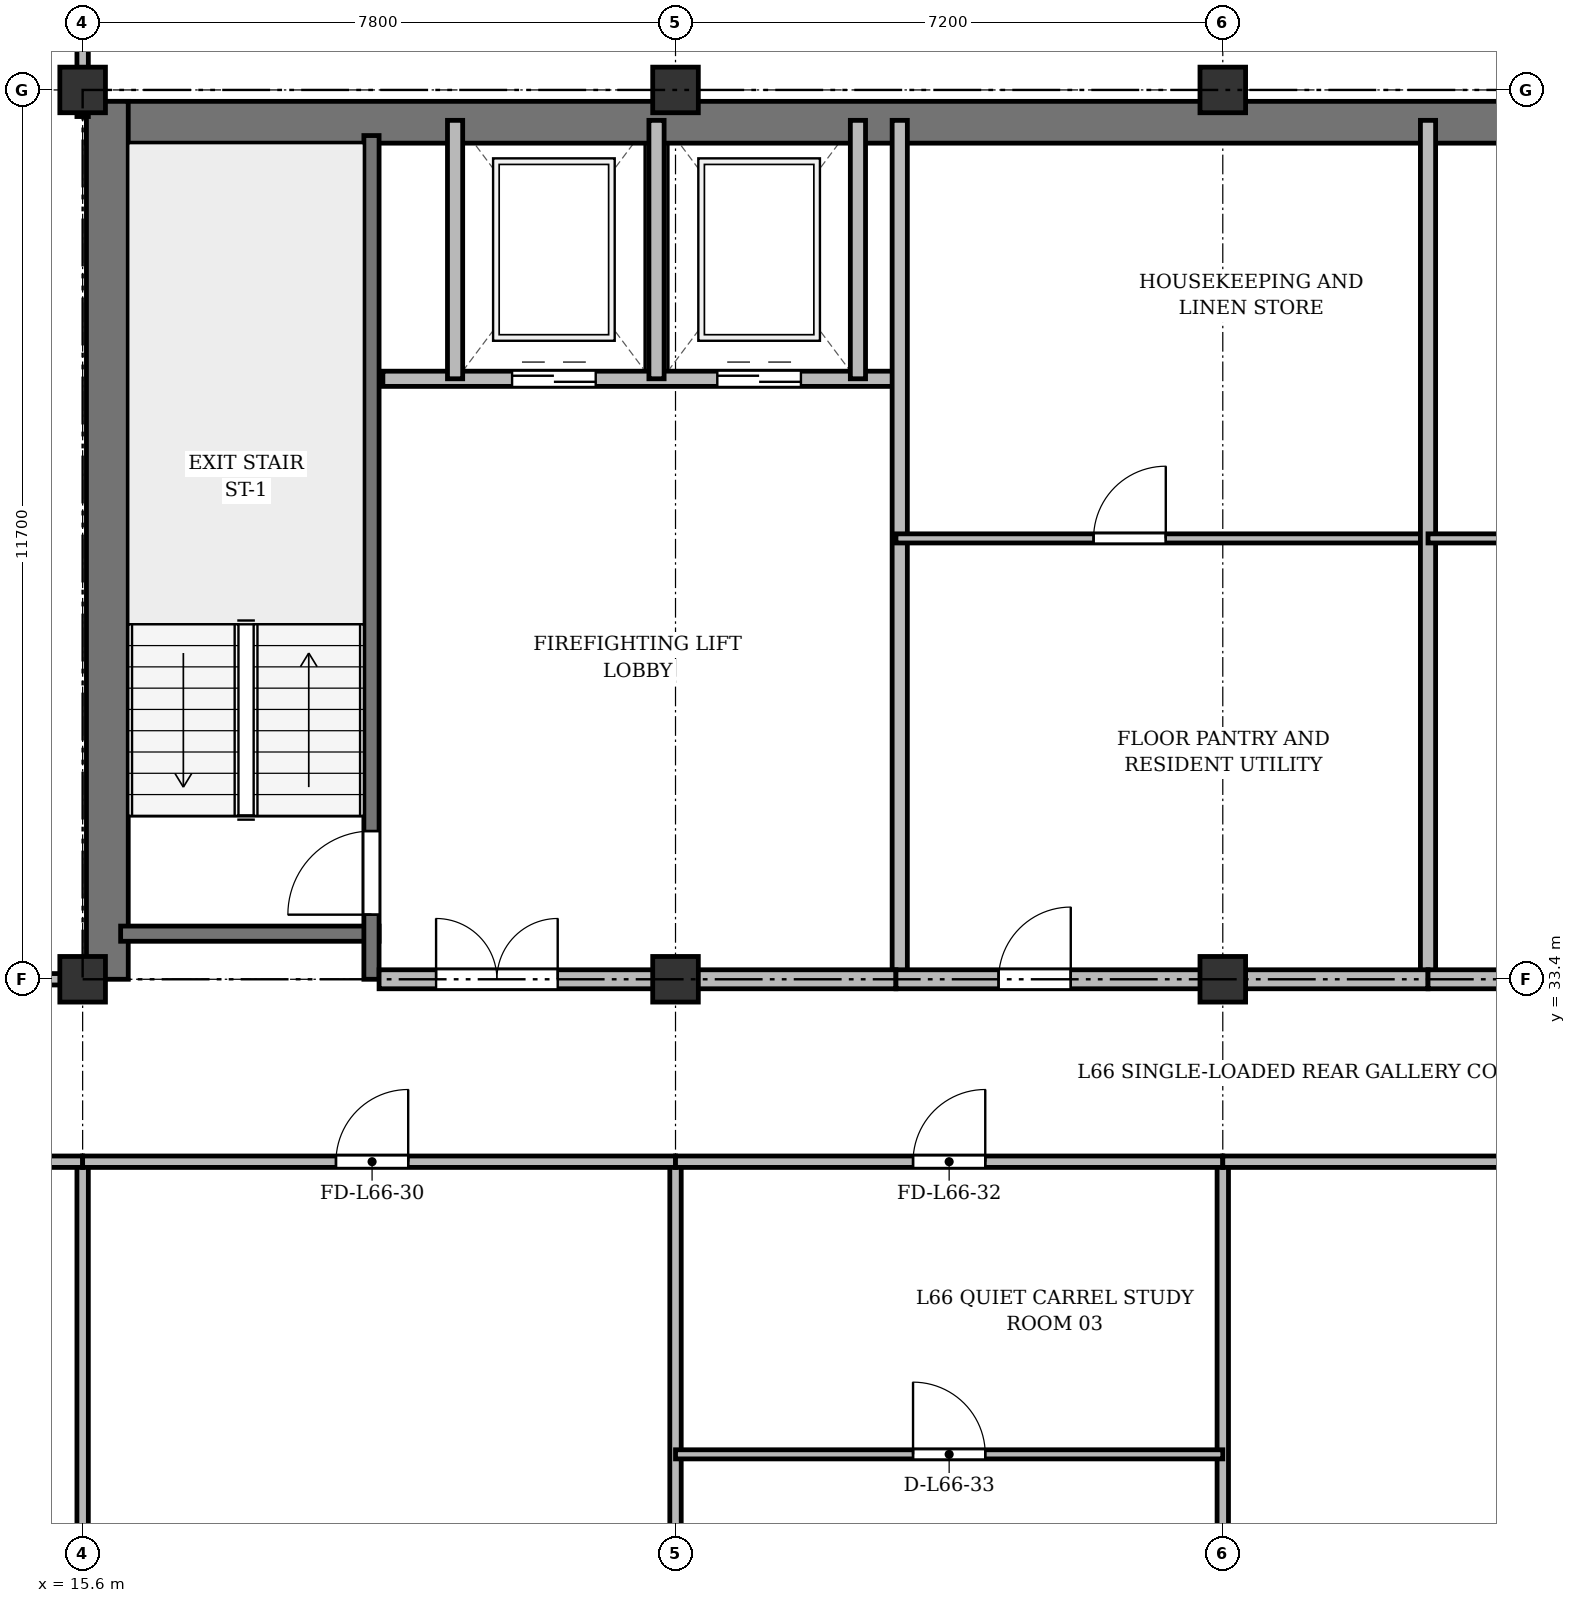
"""IFC4 building model, lengths in metres.
Left out: names, types, materials, properties, quantities, classifications, styles, units other than length and angle.
Written with IfcOpenShell. Run it as: python <this file> out.ifc"""

import sys

from ifc_helpers import new_model, si_unit, direction, frame, frame_2d, origin, origin_2d, place, context, subcontext, project, spatial, rectangle, extrude, source, transform, mapped, element, fill, save


model = new_model("IFC4")
c1 = context("Model", 3, precision=1e-05, world=origin(), true_north=direction((0.0, 1.0)))
c2 = subcontext(c1, "Body", "Model", "MODEL_VIEW")
j1 = project(units=[si_unit("LENGTHUNIT", "METRE"), si_unit("PLANEANGLEUNIT", "RADIAN")], contexts=[c1])
p1 = place(None, origin())
s1 = spatial("IfcSite", under=j1, at=p1, CompositionType="ELEMENT")
p2 = place(p1, origin())
s2 = spatial("IfcBuilding", under=s1, at=p2, CompositionType="ELEMENT")
p3 = place(p2, frame((0.0, 0.0, 255.9)))
s3 = spatial("IfcBuildingStorey", under=s2, at=p3, CompositionType="ELEMENT", Elevation=255.9)
m1 = source(origin(), c2, "Body", "SweptSolid", [
    extrude(rectangle(XDim=0.6, YDim=0.6, at=origin_2d()), origin(), (0.0, 0.0, 1.0), 3.6),
])
for number, where, z_axis, x_axis in (
    (1, (15.6, 33.4, 0.0), (0.0, 0.0, 1.0), (1.0, 0.0, 0.0)),
    (2, (15.6, 45.1, 0.0), (0.0, 0.0, 1.0), (1.0, 0.0, 0.0)),
    (3, (23.4, 33.4, 0.0), (0.0, 0.0, 1.0), (1.0, 0.0, 0.0)),
    (4, (23.4, 45.1, 0.0), (0.0, 0.0, 1.0), (1.0, 0.0, 0.0)),
    (5, (30.6, 33.4, 0.0), (0.0, 0.0, 1.0), (1.0, 0.0, 0.0)),
    (6, (30.6, 45.1, 0.0), (0.0, 0.0, 1.0), (1.0, 0.0, 0.0)),
):
    element("IfcColumn", number, at=place(p3, frame(where, z_axis=z_axis, x_axis=x_axis)), inside=s3, PredefinedType="COLUMN", context=c2, shape_type="MappedRepresentation", body=[
        mapped(m1, transform((0.0, 0.0, 0.0), x_axis=(1.0, 0.0, 0.0), y_axis=(0.0, 1.0, 0.0), z_axis=(0.0, 0.0, 1.0), scale=1.0)),
    ])
p4 = place(p3, frame((15.65, 44.675, 0.0), z_axis=(0.0, 0.0, 1.0), x_axis=(1.0, 0.0, 0.0)))
e7 = element("IfcWall", 7, at=p4, inside=s3, PredefinedType="SHEAR", context=c2, shape_type="SweptSolid", body=[
    extrude(rectangle(XDim=43.1, YDim=0.55, at=frame_2d((21.55, 0.0))), origin(), (0.0, 0.0, 1.0), 3.37),
])
p5 = place(p3, frame((15.925, 33.4, 0.0), z_axis=(0.0, 0.0, 1.0), x_axis=(0.0, 1.0, 0.0)))
e8 = element("IfcWall", 8, at=p5, inside=s3, PredefinedType="SHEAR", context=c2, shape_type="SweptSolid", body=[
    extrude(rectangle(XDim=11.55, YDim=0.55, at=frame_2d((5.775, 0.0))), origin(), (0.0, 0.0, 1.0), 3.37),
])
p6 = place(p3, frame((16.1, 34.0, 0.0), z_axis=(0.0, 0.0, 1.0), x_axis=(1.0, 0.0, 0.0)))
e9 = element("IfcWall", 9, at=p6, inside=s3, PredefinedType="SHEAR", context=c2, shape_type="SweptSolid", body=[
    extrude(rectangle(XDim=3.4, YDim=0.2, at=frame_2d((1.7, 0.0))), origin(), (0.0, 0.0, 1.0), 3.37),
])
p7 = place(p3, frame((19.4, 33.4, 0.0), z_axis=(0.0, 0.0, 1.0), x_axis=(0.0, 1.0, 0.0)))
e10 = element("IfcWall", 10, at=p7, inside=s3, PredefinedType="SHEAR", context=c2, shape_type="SweptSolid", body=[
    extrude(rectangle(XDim=11.1, YDim=0.2, at=frame_2d((5.55, 0.0))), origin(), (0.0, 0.0, 1.0), 3.37),
])
p8 = place(p7, frame((0.85, 0.0, 0.0)))
e11 = element("IfcOpeningElement", 11, at=p8, cuts=e10, PredefinedType="OPENING", context=c2, shape_type="SweptSolid", body=[
    extrude(rectangle(XDim=1.1, YDim=2.15, at=frame_2d((0.55, 1.075))), frame((0.0, 0.11, 0.0), z_axis=(0.0, -1.0, 0.0), x_axis=(1.0, 0.0, 0.0)), (0.0, 0.0, 1.0), 0.22),
])
p9 = place(p3, frame((19.55, 41.3, 0.0), z_axis=(0.0, 0.0, 1.0), x_axis=(1.0, 0.0, 0.0)))
e12 = element("IfcWall", 12, at=p9, inside=s3, PredefinedType="SOLIDWALL", context=c2, shape_type="SweptSolid", body=[
    extrude(rectangle(XDim=6.75, YDim=0.2, at=frame_2d((3.375, 0.0))), origin(), (0.0, 0.0, 1.0), 3.37),
])
p10 = place(p9, frame((1.7, 0.0, 0.0)))
e13 = element("IfcOpeningElement", 13, at=p10, cuts=e12, PredefinedType="OPENING", context=c2, shape_type="SweptSolid", body=[
    extrude(rectangle(XDim=1.1, YDim=2.15, at=frame_2d((0.55, 1.075))), frame((0.0, 0.11, 0.0), z_axis=(0.0, -1.0, 0.0), x_axis=(1.0, 0.0, 0.0)), (0.0, 0.0, 1.0), 0.22),
])
p11 = place(p9, frame((4.4, 0.0, 0.0)))
e14 = element("IfcOpeningElement", 14, at=p11, cuts=e12, PredefinedType="OPENING", context=c2, shape_type="SweptSolid", body=[
    extrude(rectangle(XDim=1.1, YDim=2.15, at=frame_2d((0.55, 1.075))), frame((0.0, 0.11, 0.0), z_axis=(0.0, -1.0, 0.0), x_axis=(1.0, 0.0, 0.0)), (0.0, 0.0, 1.0), 0.22),
])
for number, where, z_axis, x_axis in (
    (15, (20.5, 41.3, 0.0), (0.0, 0.0, 1.0), (0.0, 1.0, 0.0)),
    (16, (23.15, 41.3, 0.0), (0.0, 0.0, 1.0), (0.0, 1.0, 0.0)),
    (17, (25.8, 41.3, 0.0), (0.0, 0.0, 1.0), (0.0, 1.0, 0.0)),
):
    element("IfcWall", number, at=place(p3, frame(where, z_axis=z_axis, x_axis=x_axis)), inside=s3, PredefinedType="SOLIDWALL", context=c2, shape_type="SweptSolid", body=[
        extrude(rectangle(XDim=3.4, YDim=0.2, at=frame_2d((1.7, 0.0))), origin(), (0.0, 0.0, 1.0), 3.37),
    ])
p12 = place(p3, frame((26.35, 33.4, 0.0), z_axis=(0.0, 0.0, 1.0), x_axis=(0.0, 1.0, 0.0)))
e18 = element("IfcWall", 18, at=p12, inside=s3, PredefinedType="SOLIDWALL", context=c2, shape_type="SweptSolid", body=[
    extrude(rectangle(XDim=11.3, YDim=0.2, at=frame_2d((5.65, 0.0))), origin(), (0.0, 0.0, 1.0), 2.92),
])
p13 = place(p3, frame((19.5, 33.4, 0.0), z_axis=(0.0, 0.0, 1.0), x_axis=(1.0, 0.0, 0.0)))
e19 = element("IfcWall", 19, at=p13, inside=s3, PredefinedType="PARTITIONING", context=c2, shape_type="SweptSolid", body=[
    extrude(rectangle(XDim=6.8, YDim=0.25, at=frame_2d((3.4, 0.0))), origin(), (0.0, 0.0, 1.0), 2.92),
])
p14 = place(p13, frame((0.75, 0.0, 0.0)))
e20 = element("IfcOpeningElement", 20, at=p14, cuts=e19, PredefinedType="OPENING", context=c2, shape_type="SweptSolid", body=[
    extrude(rectangle(XDim=1.6, YDim=2.2, at=frame_2d((0.8, 1.1))), frame((0.0, 0.135, 0.0), z_axis=(0.0, -1.0, 0.0), x_axis=(1.0, 0.0, 0.0)), (0.0, 0.0, 1.0), 0.27),
])
p15 = place(p3, frame((26.3, 39.2, 0.0), z_axis=(0.0, 0.0, 1.0), x_axis=(1.0, 0.0, 0.0)))
e21 = element("IfcWall", 21, at=p15, inside=s3, PredefinedType="PARTITIONING", context=c2, shape_type="SweptSolid", body=[
    extrude(rectangle(XDim=7.0, YDim=0.12, at=frame_2d((3.5, 0.0))), origin(), (0.0, 0.0, 1.0), 2.87),
])
p16 = place(p15, frame((2.6, 0.0, 0.0)))
e22 = element("IfcOpeningElement", 22, at=p16, cuts=e21, PredefinedType="OPENING", context=c2, shape_type="SweptSolid", body=[
    extrude(rectangle(XDim=0.95, YDim=2.15, at=frame_2d((0.475, 1.075))), frame((0.0, 0.07, 0.0), z_axis=(0.0, -1.0, 0.0), x_axis=(1.0, 0.0, 0.0)), (0.0, 0.0, 1.0), 0.14),
])
p17 = place(p3, frame((33.3, 33.4, 0.0), z_axis=(0.0, 0.0, 1.0), x_axis=(0.0, 1.0, 0.0)))
e23 = element("IfcWall", 23, at=p17, inside=s3, PredefinedType="SOLIDWALL", context=c2, shape_type="SweptSolid", body=[
    extrude(rectangle(XDim=11.3, YDim=0.2, at=frame_2d((5.65, 0.0))), origin(), (0.0, 0.0, 1.0), 2.92),
])
p18 = place(p3, frame((33.3, 39.2, 0.0), z_axis=(0.0, 0.0, 1.0), x_axis=(1.0, 0.0, 0.0)))
e24 = element("IfcWall", 24, at=p18, inside=s3, PredefinedType="PARTITIONING", context=c2, shape_type="SweptSolid", body=[
    extrude(rectangle(XDim=6.8, YDim=0.12, at=frame_2d((3.4, 0.0))), origin(), (0.0, 0.0, 1.0), 3.37),
])
p19 = place(p18, frame((2.6, 0.0, 0.0)))
e25 = element("IfcOpeningElement", 25, at=p19, cuts=e24, PredefinedType="OPENING", context=c2, shape_type="SweptSolid", body=[
    extrude(rectangle(XDim=0.95, YDim=2.15, at=frame_2d((0.475, 1.075))), frame((0.0, 0.07, 0.0), z_axis=(0.0, -1.0, 0.0), x_axis=(1.0, 0.0, 0.0)), (0.0, 0.0, 1.0), 0.14),
])
p20 = place(p3, frame((26.3, 33.4, 0.0), z_axis=(0.0, 0.0, 1.0), x_axis=(1.0, 0.0, 0.0)))
e26 = element("IfcWall", 26, at=p20, inside=s3, PredefinedType="PARTITIONING", context=c2, shape_type="SweptSolid", body=[
    extrude(rectangle(XDim=7.0, YDim=0.25, at=frame_2d((3.5, 0.0))), origin(), (0.0, 0.0, 1.0), 2.92),
])
p21 = place(p20, frame((1.35, 0.0, 0.0)))
e27 = element("IfcOpeningElement", 27, at=p21, cuts=e26, PredefinedType="OPENING", context=c2, shape_type="SweptSolid", body=[
    extrude(rectangle(XDim=0.95, YDim=2.15, at=frame_2d((0.475, 1.075))), frame((0.0, 0.135, 0.0), z_axis=(0.0, -1.0, 0.0), x_axis=(1.0, 0.0, 0.0)), (0.0, 0.0, 1.0), 0.27),
])
p22 = place(p3, frame((33.3, 33.4, 0.0), z_axis=(0.0, 0.0, 1.0), x_axis=(1.0, 0.0, 0.0)))
e28 = element("IfcWall", 28, at=p22, inside=s3, PredefinedType="PARTITIONING", context=c2, shape_type="SweptSolid", body=[
    extrude(rectangle(XDim=6.8, YDim=0.25, at=frame_2d((3.4, 0.0))), origin(), (0.0, 0.0, 1.0), 2.92),
])
p23 = place(p22, frame((2.4, 0.0, 0.0)))
e29 = element("IfcOpeningElement", 29, at=p23, cuts=e28, PredefinedType="OPENING", context=c2, shape_type="SweptSolid", body=[
    extrude(rectangle(XDim=1.0, YDim=2.15, at=frame_2d((0.5, 1.075))), frame((0.0, 0.135, 0.0), z_axis=(0.0, -1.0, 0.0), x_axis=(1.0, 0.0, 0.0)), (0.0, 0.0, 1.0), 0.27),
])
p24 = place(p3, frame((8.45, 33.4, 0.0), z_axis=(0.0, 0.0, 1.0), x_axis=(1.0, 0.0, 0.0)))
e30 = element("IfcWall", 30, at=p24, inside=s3, PredefinedType="PARTITIONING", context=c2, shape_type="SweptSolid", body=[
    extrude(rectangle(XDim=7.15, YDim=0.15, at=frame_2d((3.575, 0.0))), origin(), (0.0, 0.0, 1.0), 2.92),
])
p25 = place(p24, frame((3.0, 0.0, 0.0)))
e31 = element("IfcOpeningElement", 31, at=p25, cuts=e30, PredefinedType="OPENING", context=c2, shape_type="SweptSolid", body=[
    extrude(rectangle(XDim=0.95, YDim=2.15, at=frame_2d((0.475, 1.075))), frame((0.0, 0.085, 0.0), z_axis=(0.0, -1.0, 0.0), x_axis=(1.0, 0.0, 0.0)), (0.0, 0.0, 1.0), 0.17),
])
p26 = place(p3, frame((15.6, 44.75, 0.0), z_axis=(0.0, 0.0, 1.0), x_axis=(0.0, 1.0, 0.0)))
e32 = element("IfcWall", 32, at=p26, inside=s3, PredefinedType="PARTITIONING", context=c2, shape_type="SweptSolid", body=[
    extrude(rectangle(XDim=3.61, YDim=0.15, at=frame_2d((1.805, 0.0))), origin(), (0.0, 0.0, 1.0), 2.87),
])
p27 = place(p26, frame((1.1, 0.0, 0.0)))
e33 = element("IfcOpeningElement", 33, at=p27, cuts=e32, PredefinedType="OPENING", context=c2, shape_type="SweptSolid", body=[
    extrude(rectangle(XDim=0.95, YDim=2.15, at=frame_2d((0.475, 1.075))), frame((0.0, 0.085, 0.0), z_axis=(0.0, -1.0, 0.0), x_axis=(1.0, 0.0, 0.0)), (0.0, 0.0, 1.0), 0.17),
])
for number, where, z_axis, x_axis in (
    (34, (15.6, 3.725, 0.0), (0.0, 0.0, 1.0), (0.0, 1.0, 0.0)),
    (35, (23.4, 3.725, 0.0), (0.0, 0.0, 1.0), (0.0, 1.0, 0.0)),
    (36, (30.6, 3.725, 0.0), (0.0, 0.0, 1.0), (0.0, 1.0, 0.0)),
):
    element("IfcWall", number, at=place(p3, frame(where, z_axis=z_axis, x_axis=x_axis)), inside=s3, PredefinedType="PARTITIONING", context=c2, shape_type="SweptSolid", body=[
        extrude(rectangle(XDim=27.275, YDim=0.15, at=frame_2d((13.637, 0.0))), origin(), (0.0, 0.0, 1.0), 2.87),
    ])
p28 = place(p3, frame((8.425, 31.0, 0.0), z_axis=(0.0, 0.0, 1.0), x_axis=(1.0, 0.0, 0.0)))
e37 = element("IfcWall", 37, at=p28, inside=s3, PredefinedType="PARTITIONING", context=c2, shape_type="SweptSolid", body=[
    extrude(rectangle(XDim=7.175, YDim=0.15, at=frame_2d((3.587, 0.0))), origin(), (0.0, 0.0, 1.0), 2.87),
])
p29 = place(p28, frame((3.112, 0.0, 0.0)))
e38 = element("IfcOpeningElement", 38, at=p29, cuts=e37, PredefinedType="OPENING", context=c2, shape_type="SweptSolid", body=[
    extrude(rectangle(XDim=0.95, YDim=2.15, at=frame_2d((0.475, 1.075))), frame((0.0, 0.085, 0.0), z_axis=(0.0, -1.0, 0.0), x_axis=(1.0, 0.0, 0.0)), (0.0, 0.0, 1.0), 0.17),
])
p30 = place(p3, frame((15.6, 31.0, 0.0), z_axis=(0.0, 0.0, 1.0), x_axis=(1.0, 0.0, 0.0)))
e39 = element("IfcWall", 39, at=p30, inside=s3, PredefinedType="PARTITIONING", context=c2, shape_type="SweptSolid", body=[
    extrude(rectangle(XDim=7.8, YDim=0.15, at=frame_2d((3.9, 0.0))), origin(), (0.0, 0.0, 1.0), 2.87),
])
p31 = place(p30, frame((3.333, 0.0, 0.0)))
e40 = element("IfcOpeningElement", 40, at=p31, cuts=e39, PredefinedType="OPENING", context=c2, shape_type="SweptSolid", body=[
    extrude(rectangle(XDim=0.95, YDim=2.15, at=frame_2d((0.475, 1.075))), frame((0.0, 0.085, 0.0), z_axis=(0.0, -1.0, 0.0), x_axis=(1.0, 0.0, 0.0)), (0.0, 0.0, 1.0), 0.17),
])
p32 = place(p3, frame((23.4, 31.0, 0.0), z_axis=(0.0, 0.0, 1.0), x_axis=(1.0, 0.0, 0.0)))
e41 = element("IfcWall", 41, at=p32, inside=s3, PredefinedType="PARTITIONING", context=c2, shape_type="SweptSolid", body=[
    extrude(rectangle(XDim=7.2, YDim=0.15, at=frame_2d((3.6, 0.0))), origin(), (0.0, 0.0, 1.0), 2.87),
])
p33 = place(p32, frame((3.125, 0.0, 0.0)))
e42 = element("IfcOpeningElement", 42, at=p33, cuts=e41, PredefinedType="OPENING", context=c2, shape_type="SweptSolid", body=[
    extrude(rectangle(XDim=0.95, YDim=2.15, at=frame_2d((0.475, 1.075))), frame((0.0, 0.085, 0.0), z_axis=(0.0, -1.0, 0.0), x_axis=(1.0, 0.0, 0.0)), (0.0, 0.0, 1.0), 0.17),
])
p34 = place(p3, frame((23.4, 27.15, 0.0), z_axis=(0.0, 0.0, 1.0), x_axis=(1.0, 0.0, 0.0)))
e43 = element("IfcWall", 43, at=p34, inside=s3, PredefinedType="PARTITIONING", context=c2, shape_type="SweptSolid", body=[
    extrude(rectangle(XDim=7.2, YDim=0.12, at=frame_2d((3.6, 0.0))), origin(), (0.0, 0.0, 1.0), 2.87),
])
p35 = place(p34, frame((3.125, 0.0, 0.0)))
e44 = element("IfcOpeningElement", 44, at=p35, cuts=e43, PredefinedType="OPENING", context=c2, shape_type="SweptSolid", body=[
    extrude(rectangle(XDim=0.95, YDim=2.15, at=frame_2d((0.475, 1.075))), frame((0.0, 0.07, 0.0), z_axis=(0.0, -1.0, 0.0), x_axis=(1.0, 0.0, 0.0)), (0.0, 0.0, 1.0), 0.14),
])
p36 = place(p3, frame((30.6, 31.0, 0.0), z_axis=(0.0, 0.0, 1.0), x_axis=(1.0, 0.0, 0.0)))
e45 = element("IfcWall", 45, at=p36, inside=s3, PredefinedType="PARTITIONING", context=c2, shape_type="SweptSolid", body=[
    extrude(rectangle(XDim=13.2, YDim=0.15, at=frame_2d((6.6, 0.0))), origin(), (0.0, 0.0, 1.0), 2.87),
])
p37 = place(p36, frame((5.8, 0.0, 0.0)))
e46 = element("IfcOpeningElement", 46, at=p37, cuts=e45, PredefinedType="OPENING", context=c2, shape_type="SweptSolid", body=[
    extrude(rectangle(XDim=1.6, YDim=2.2, at=frame_2d((0.8, 1.1))), frame((0.0, 0.085, 0.0), z_axis=(0.0, -1.0, 0.0), x_axis=(1.0, 0.0, 0.0)), (0.0, 0.0, 1.0), 0.17),
])
m2 = source(origin(), c2, "Body", "SweptSolid", [
    extrude(rectangle(XDim=1.1, YDim=2.15, at=frame_2d((0.55, 1.075))), frame((0.0, 0.025, 0.0), z_axis=(0.0, -1.0, 0.0), x_axis=(1.0, 0.0, 0.0)), (0.0, 0.0, 1.0), 0.05),
])
p38 = place(p8, origin())
e47 = element("IfcDoor", 47, at=p38, inside=s3, OperationType="SINGLE_SWING_LEFT", PredefinedType="DOOR", context=c2, shape_type="MappedRepresentation", body=[
    mapped(m2, transform((0.0, 0.0, 0.0), x_axis=(1.0, 0.0, 0.0), y_axis=(0.0, 1.0, 0.0), z_axis=(0.0, 0.0, 1.0), scale=1.0)),
])
fill(e11, e47)
p39 = place(p10, origin())
e48 = element("IfcDoor", 48, at=p39, inside=s3, OperationType="DOUBLE_DOOR_SLIDING", PredefinedType="DOOR", context=c2, shape_type="MappedRepresentation", body=[
    mapped(m2, transform((0.0, 0.0, 0.0), x_axis=(1.0, 0.0, 0.0), y_axis=(0.0, 1.0, 0.0), z_axis=(0.0, 0.0, 1.0), scale=1.0)),
])
fill(e13, e48)
p40 = place(p11, origin())
e49 = element("IfcDoor", 49, at=p40, inside=s3, OperationType="DOUBLE_DOOR_SLIDING", PredefinedType="DOOR", context=c2, shape_type="MappedRepresentation", body=[
    mapped(m2, transform((0.0, 0.0, 0.0), x_axis=(1.0, 0.0, 0.0), y_axis=(0.0, 1.0, 0.0), z_axis=(0.0, 0.0, 1.0), scale=1.0)),
])
fill(e14, e49)
m3 = source(origin(), c2, "Body", "SweptSolid", [
    extrude(rectangle(XDim=1.6, YDim=2.2, at=frame_2d((0.8, 1.1))), frame((0.0, 0.025, 0.0), z_axis=(0.0, -1.0, 0.0), x_axis=(1.0, 0.0, 0.0)), (0.0, 0.0, 1.0), 0.05),
])
p41 = place(p14, origin())
e50 = element("IfcDoor", 50, at=p41, inside=s3, OperationType="DOUBLE_DOOR_SINGLE_SWING", PredefinedType="DOOR", context=c2, shape_type="MappedRepresentation", body=[
    mapped(m3, transform((0.0, 0.0, 0.0), x_axis=(1.0, 0.0, 0.0), y_axis=(0.0, 1.0, 0.0), z_axis=(0.0, 0.0, 1.0), scale=1.0)),
])
fill(e20, e50)
m4 = source(origin(), c2, "Body", "SweptSolid", [
    extrude(rectangle(XDim=0.95, YDim=2.15, at=frame_2d((0.475, 1.075))), frame((0.0, 0.025, 0.0), z_axis=(0.0, -1.0, 0.0), x_axis=(1.0, 0.0, 0.0)), (0.0, 0.0, 1.0), 0.05),
])
p42 = place(p16, origin())
e51 = element("IfcDoor", 51, at=p42, inside=s3, OperationType="SINGLE_SWING_RIGHT", PredefinedType="DOOR", context=c2, shape_type="MappedRepresentation", body=[
    mapped(m4, transform((0.0, 0.0, 0.0), x_axis=(1.0, 0.0, 0.0), y_axis=(0.0, 1.0, 0.0), z_axis=(0.0, 0.0, 1.0), scale=1.0)),
])
fill(e22, e51)
p43 = place(p21, origin())
e52 = element("IfcDoor", 52, at=p43, inside=s3, OperationType="SINGLE_SWING_RIGHT", PredefinedType="DOOR", context=c2, shape_type="MappedRepresentation", body=[
    mapped(m4, transform((0.0, 0.0, 0.0), x_axis=(1.0, 0.0, 0.0), y_axis=(0.0, 1.0, 0.0), z_axis=(0.0, 0.0, 1.0), scale=1.0)),
])
fill(e27, e52)
p44 = place(p31, origin())
e53 = element("IfcDoor", 53, at=p44, inside=s3, OperationType="SINGLE_SWING_RIGHT", PredefinedType="DOOR", context=c2, shape_type="MappedRepresentation", body=[
    mapped(m4, transform((0.0, 0.0, 0.0), x_axis=(1.0, 0.0, 0.0), y_axis=(0.0, 1.0, 0.0), z_axis=(0.0, 0.0, 1.0), scale=1.0)),
])
fill(e40, e53)
p45 = place(p33, origin())
e54 = element("IfcDoor", 54, at=p45, inside=s3, OperationType="SINGLE_SWING_RIGHT", PredefinedType="DOOR", context=c2, shape_type="MappedRepresentation", body=[
    mapped(m4, transform((0.0, 0.0, 0.0), x_axis=(1.0, 0.0, 0.0), y_axis=(0.0, 1.0, 0.0), z_axis=(0.0, 0.0, 1.0), scale=1.0)),
])
fill(e42, e54)
p46 = place(p35, origin())
e55 = element("IfcDoor", 55, at=p46, inside=s3, OperationType="SINGLE_SWING_LEFT", PredefinedType="DOOR", context=c2, shape_type="MappedRepresentation", body=[
    mapped(m4, transform((0.0, 0.0, 0.0), x_axis=(1.0, 0.0, 0.0), y_axis=(0.0, 1.0, 0.0), z_axis=(0.0, 0.0, 1.0), scale=1.0)),
])
fill(e44, e55)
save(model, sys.argv[1])
